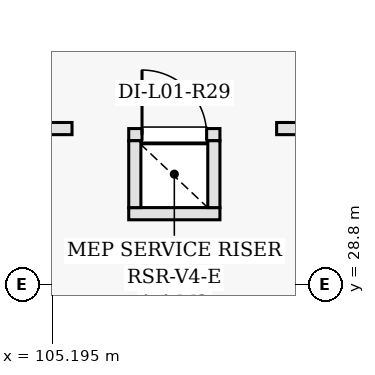
"""IFC4 building model, lengths in metres.
Left out: names, types, materials, properties, quantities, classifications, styles, units other than length and angle.
Written with IfcOpenShell. Run it as: python <this file> out.ifc"""

import sys

from ifc_helpers import new_model, si_unit, direction, frame, frame_2d, origin, place, context, subcontext, project, spatial, rectangle, extrude, element, fill, save


model = new_model("IFC4")
c1 = context("Model", 3, precision=1e-05, world=origin(), true_north=direction((0.0, 1.0)))
c2 = subcontext(c1, "Body", "Model", "MODEL_VIEW")
j1 = project(units=[si_unit("LENGTHUNIT", "METRE"), si_unit("PLANEANGLEUNIT", "RADIAN")], contexts=[c1])
p1 = place(None, origin())
s1 = spatial("IfcSite", under=j1, at=p1, CompositionType="ELEMENT")
p2 = place(p1, origin())
s2 = spatial("IfcBuilding", under=s1, at=p2, CompositionType="ELEMENT")
p3 = place(p2, frame((0.0, 0.0, 4.8)))
s3 = spatial("IfcBuildingStorey", under=s2, at=p3, CompositionType="ELEMENT", Elevation=4.8)
p4 = place(p3, frame((106.2, 29.73, 0.0), z_axis=(0.0, 0.0, 1.0), x_axis=(1.0, 0.0, 0.0)))
e1 = element("IfcWall", 1, at=p4, inside=s3, PredefinedType="PARTITIONING", context=c2, shape_type="SweptSolid", body=[
    extrude(rectangle(XDim=1.2, YDim=0.16, at=frame_2d((0.6, 0.0))), origin(), (0.0, 0.0, 1.0), 4.58),
])
p5 = place(p3, frame((106.2, 30.77, 0.0), z_axis=(0.0, 0.0, 1.0), x_axis=(1.0, 0.0, 0.0)))
e2 = element("IfcWall", 2, at=p5, inside=s3, PredefinedType="PARTITIONING", context=c2, shape_type="SweptSolid", body=[
    extrude(rectangle(XDim=1.2, YDim=0.16, at=frame_2d((0.6, 0.0))), origin(), (0.0, 0.0, 1.0), 4.58),
])
p6 = place(p5, frame((0.175, 0.0, 0.0)))
e3 = element("IfcOpeningElement", 3, at=p6, cuts=e2, PredefinedType="OPENING", context=c2, shape_type="SweptSolid", body=[
    extrude(rectangle(XDim=0.85, YDim=2.02, at=frame_2d((0.425, 1.01))), frame((0.0, 0.09, 0.0), z_axis=(0.0, -1.0, 0.0), x_axis=(1.0, 0.0, 0.0)), (0.0, 0.0, 1.0), 0.18),
])
for number, where, z_axis, x_axis in (
    (4, (106.28, 29.81, 0.0), (0.0, 0.0, 1.0), (0.0, 1.0, 0.0)),
    (5, (107.32, 29.81, 0.0), (0.0, 0.0, 1.0), (0.0, 1.0, 0.0)),
):
    element("IfcWall", number, at=place(p3, frame(where, z_axis=z_axis, x_axis=x_axis)), inside=s3, PredefinedType="PARTITIONING", context=c2, shape_type="SweptSolid", body=[
        extrude(rectangle(XDim=0.88, YDim=0.16, at=frame_2d((0.44, 0.0))), origin(), (0.0, 0.0, 1.0), 4.58),
    ])
p7 = place(p3, frame((102.487, 30.85, 0.0), z_axis=(0.0, 0.0, 1.0), x_axis=(1.0, 0.0, 0.0)))
e6 = element("IfcWall", 6, at=p7, inside=s3, PredefinedType="PARTITIONING", context=c2, shape_type="SweptSolid", body=[
    extrude(rectangle(XDim=2.967, YDim=0.16, at=frame_2d((1.483, 0.0))), origin(), (0.0, 0.0, 1.0), 4.48),
])
p8 = place(p7, frame((0.933, 0.0, 0.0)))
e7 = element("IfcOpeningElement", 7, at=p8, cuts=e6, PredefinedType="OPENING", context=c2, shape_type="SweptSolid", body=[
    extrude(rectangle(XDim=1.1, YDim=2.15, at=frame_2d((0.55, 1.075))), frame((0.0, 0.09, 0.0), z_axis=(0.0, -1.0, 0.0), x_axis=(1.0, 0.0, 0.0)), (0.0, 0.0, 1.0), 0.18),
])
p9 = place(p3, frame((108.146, 30.85, 0.0), z_axis=(0.0, 0.0, 1.0), x_axis=(1.0, 0.0, 0.0)))
e8 = element("IfcWall", 8, at=p9, inside=s3, PredefinedType="PARTITIONING", context=c2, shape_type="SweptSolid", body=[
    extrude(rectangle(XDim=3.149, YDim=0.16, at=frame_2d((1.574, 0.0))), origin(), (0.0, 0.0, 1.0), 4.48),
])
p10 = place(p6, origin())
e9 = element("IfcDoor", 9, at=p10, inside=s3, OperationType="SINGLE_SWING_LEFT", PredefinedType="DOOR", context=c2, shape_type="SweptSolid", body=[
    extrude(rectangle(XDim=0.85, YDim=2.02, at=frame_2d((0.425, 1.01))), frame((0.0, 0.025, 0.0), z_axis=(0.0, -1.0, 0.0), x_axis=(1.0, 0.0, 0.0)), (0.0, 0.0, 1.0), 0.05),
])
fill(e3, e9)
save(model, sys.argv[1])
